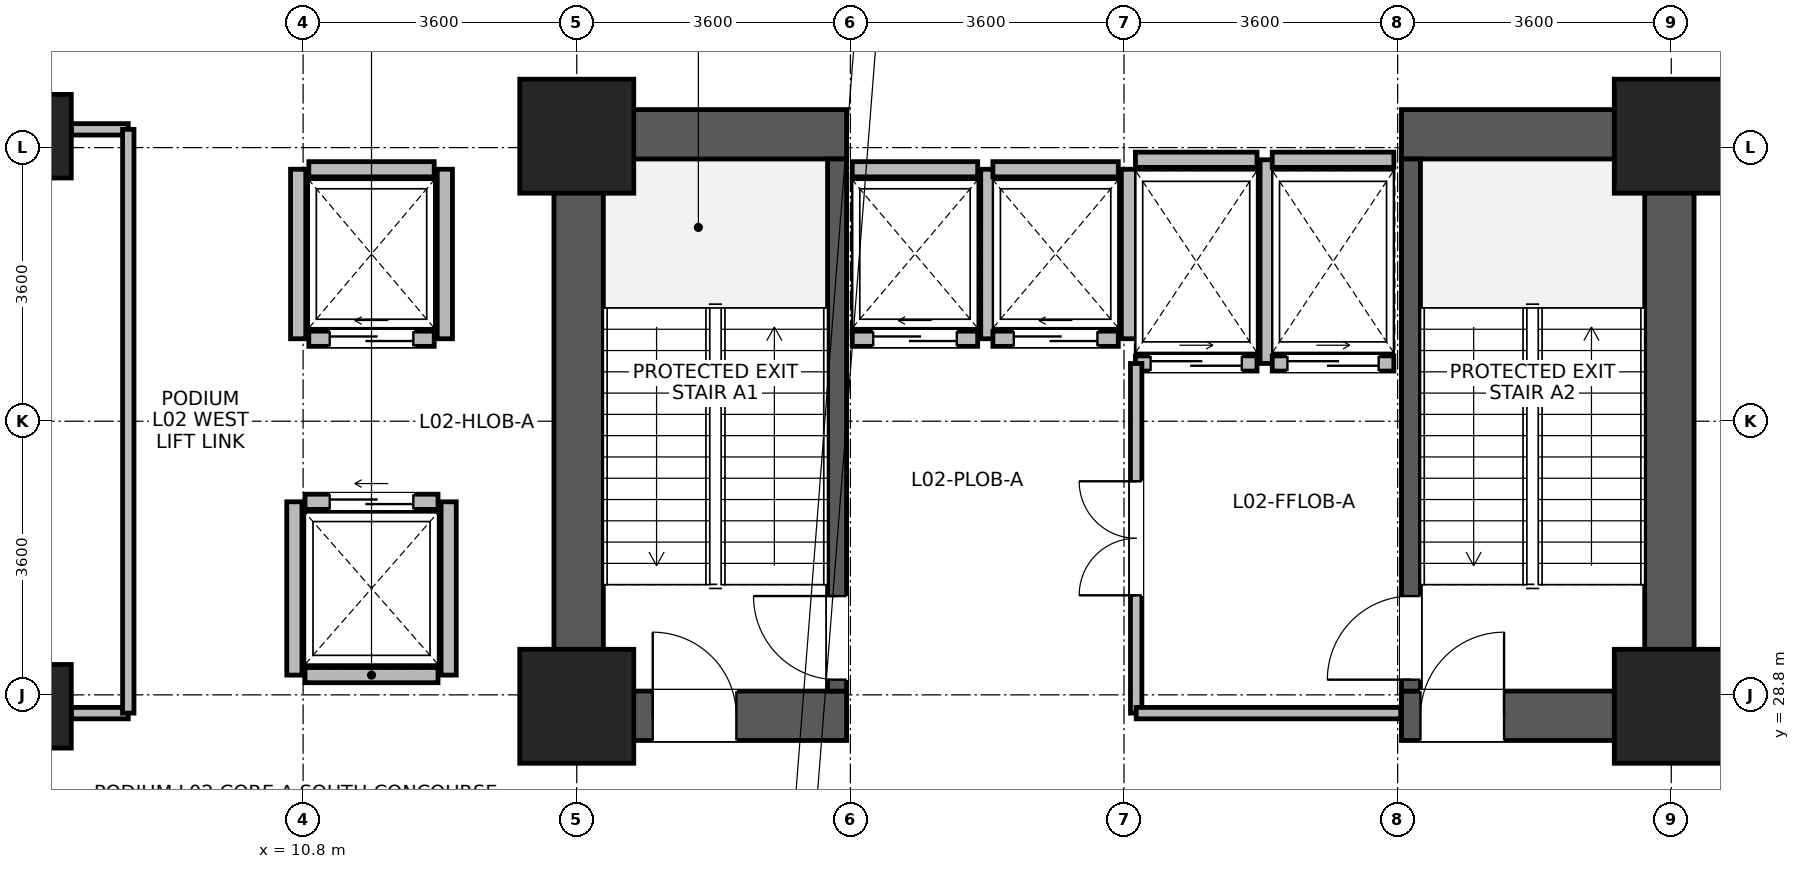
"""IFC4 building model, lengths in metres.
Left out: names, types, materials, properties, quantities, classifications, styles, units other than length and angle.
Written with IfcOpenShell. Run it as: python <this file> out.ifc"""

import sys

from ifc_helpers import new_model, si_unit, direction, frame, frame_2d, origin, origin_2d, place, context, subcontext, project, spatial, rectangle, circle, extrude, source, transform, mapped, element, fill, save


model = new_model("IFC4")
c1 = context("Model", 3, precision=1e-05, world=origin(), true_north=direction((0.0, 1.0)))
c2 = subcontext(c1, "Body", "Model", "MODEL_VIEW")
j1 = project(units=[si_unit("LENGTHUNIT", "METRE"), si_unit("PLANEANGLEUNIT", "RADIAN")], contexts=[c1])
p1 = place(None, origin())
s1 = spatial("IfcSite", under=j1, at=p1, CompositionType="ELEMENT")
p2 = place(p1, origin())
s2 = spatial("IfcBuilding", under=s1, at=p2, CompositionType="ELEMENT")
p3 = place(p2, frame((0.0, 0.0, 10.2)))
s3 = spatial("IfcBuildingStorey", under=s2, at=p3, CompositionType="ELEMENT", Elevation=10.2)
for number, where, z_axis, x_axis in (
    (1, (14.425, 28.2, 0.0), (0.0, 0.0, 1.0), (0.0, 1.0, 0.0)),
    (2, (28.775, 28.2, 0.0), (0.0, 0.0, 1.0), (0.0, 1.0, 0.0)),
):
    element("IfcWall", number, at=place(p3, frame(where, z_axis=z_axis, x_axis=x_axis)), inside=s3, PredefinedType="SHEAR", context=c2, shape_type="SweptSolid", body=[
        extrude(rectangle(XDim=8.3, YDim=0.65, at=frame_2d((4.15, 0.0))), origin(), (0.0, 0.0, 1.0), 4.52),
    ])
p4 = place(p3, frame((14.75, 28.525, 0.0), z_axis=(0.0, 0.0, 1.0), x_axis=(1.0, 0.0, 0.0)))
e3 = element("IfcWall", 3, at=p4, inside=s3, PredefinedType="SHEAR", context=c2, shape_type="SweptSolid", body=[
    extrude(rectangle(XDim=3.2, YDim=0.65, at=frame_2d((1.6, 0.0))), origin(), (0.0, 0.0, 1.0), 4.52),
])
p5 = place(p4, frame((0.65, 0.0, 0.0)))
e4 = element("IfcOpeningElement", 4, at=p5, cuts=e3, PredefinedType="OPENING", context=c2, shape_type="SweptSolid", body=[
    extrude(rectangle(XDim=1.1, YDim=2.08, at=frame_2d((0.55, 1.04))), frame((0.0, 0.335, 0.0), z_axis=(0.0, -1.0, 0.0), x_axis=(1.0, 0.0, 0.0)), (0.0, 0.0, 1.0), 0.67),
])
p6 = place(p3, frame((25.25, 28.525, 0.0), z_axis=(0.0, 0.0, 1.0), x_axis=(1.0, 0.0, 0.0)))
e5 = element("IfcWall", 5, at=p6, inside=s3, PredefinedType="SHEAR", context=c2, shape_type="SweptSolid", body=[
    extrude(rectangle(XDim=3.2, YDim=0.65, at=frame_2d((1.6, 0.0))), origin(), (0.0, 0.0, 1.0), 4.52),
])
p7 = place(p6, frame((0.25, 0.0, 0.0)))
e6 = element("IfcOpeningElement", 6, at=p7, cuts=e5, PredefinedType="OPENING", context=c2, shape_type="SweptSolid", body=[
    extrude(rectangle(XDim=1.1, YDim=2.08, at=frame_2d((0.55, 1.04))), frame((0.0, 0.335, 0.0), z_axis=(0.0, -1.0, 0.0), x_axis=(1.0, 0.0, 0.0)), (0.0, 0.0, 1.0), 0.67),
])
for number, where, z_axis, x_axis in (
    (7, (14.75, 36.175, 0.0), (0.0, 0.0, 1.0), (1.0, 0.0, 0.0)),
    (8, (25.25, 36.175, 0.0), (0.0, 0.0, 1.0), (1.0, 0.0, 0.0)),
):
    element("IfcWall", number, at=place(p3, frame(where, z_axis=z_axis, x_axis=x_axis)), inside=s3, PredefinedType="SHEAR", context=c2, shape_type="SweptSolid", body=[
        extrude(rectangle(XDim=3.2, YDim=0.65, at=frame_2d((1.6, 0.0))), origin(), (0.0, 0.0, 1.0), 4.52),
    ])
p8 = place(p3, frame((17.825, 28.85, 0.0), z_axis=(0.0, 0.0, 1.0), x_axis=(0.0, 1.0, 0.0)))
e9 = element("IfcWall", 9, at=p8, inside=s3, PredefinedType="SHEAR", context=c2, shape_type="SweptSolid", body=[
    extrude(rectangle(XDim=7.0, YDim=0.25, at=frame_2d((3.5, 0.0))), origin(), (0.0, 0.0, 1.0), 4.52),
])
p9 = place(p8, frame((0.15, 0.0, 0.0)))
e10 = element("IfcOpeningElement", 10, at=p9, cuts=e9, PredefinedType="OPENING", context=c2, shape_type="SweptSolid", body=[
    extrude(rectangle(XDim=1.1, YDim=2.08, at=frame_2d((0.55, 1.04))), frame((0.0, 0.135, 0.0), z_axis=(0.0, -1.0, 0.0), x_axis=(1.0, 0.0, 0.0)), (0.0, 0.0, 1.0), 0.27),
])
p10 = place(p3, frame((25.375, 28.85, 0.0), z_axis=(0.0, 0.0, 1.0), x_axis=(0.0, 1.0, 0.0)))
e11 = element("IfcWall", 11, at=p10, inside=s3, PredefinedType="SHEAR", context=c2, shape_type="SweptSolid", body=[
    extrude(rectangle(XDim=7.0, YDim=0.25, at=frame_2d((3.5, 0.0))), origin(), (0.0, 0.0, 1.0), 4.52),
])
p11 = place(p10, frame((0.15, 0.0, 0.0)))
e12 = element("IfcOpeningElement", 12, at=p11, cuts=e11, PredefinedType="OPENING", context=c2, shape_type="SweptSolid", body=[
    extrude(rectangle(XDim=1.1, YDim=2.08, at=frame_2d((0.55, 1.04))), frame((0.0, 0.135, 0.0), z_axis=(0.0, -1.0, 0.0), x_axis=(1.0, 0.0, 0.0)), (0.0, 0.0, 1.0), 0.27),
])
m1 = source(origin(), c2, "Body", "SweptSolid", [
    extrude(circle(Radius=0.55, at=origin_2d()), origin(), (0.0, 0.0, 1.0), 4.8),
])
for number, where, z_axis, x_axis in (
    (13, (7.2, 28.65, 0.0), (0.0, 0.0, 1.0), (1.0, 0.0, 0.0)),
    (14, (7.2, 36.15, 0.0), (0.0, 0.0, 1.0), (1.0, 0.0, 0.0)),
):
    element("IfcColumn", number, at=place(p3, frame(where, z_axis=z_axis, x_axis=x_axis)), inside=s3, PredefinedType="COLUMN", context=c2, shape_type="MappedRepresentation", body=[
        mapped(m1, transform((0.0, 0.0, 0.0), x_axis=(1.0, 0.0, 0.0), y_axis=(0.0, 1.0, 0.0), z_axis=(0.0, 0.0, 1.0), scale=1.0)),
    ])
m2 = source(origin(), c2, "Body", "SweptSolid", [
    extrude(rectangle(XDim=1.5, YDim=1.5, at=origin_2d()), origin(), (0.0, 0.0, 1.0), 4.8),
])
for number, where, z_axis, x_axis in (
    (15, (14.4, 28.65, 0.0), (0.0, 0.0, 1.0), (1.0, 0.0, 0.0)),
    (16, (14.4, 36.15, 0.0), (0.0, 0.0, 1.0), (1.0, 0.0, 0.0)),
    (17, (28.8, 28.65, 0.0), (0.0, 0.0, 1.0), (1.0, 0.0, 0.0)),
    (18, (28.8, 36.15, 0.0), (0.0, 0.0, 1.0), (1.0, 0.0, 0.0)),
):
    element("IfcColumn", number, at=place(p3, frame(where, z_axis=z_axis, x_axis=x_axis)), inside=s3, PredefinedType="COLUMN", context=c2, shape_type="MappedRepresentation", body=[
        mapped(m2, transform((0.0, 0.0, 0.0), x_axis=(1.0, 0.0, 0.0), y_axis=(0.0, 1.0, 0.0), z_axis=(0.0, 0.0, 1.0), scale=1.0)),
    ])
p12 = place(p3, frame((18.025, 33.485, 0.0), z_axis=(0.0, 0.0, 1.0), x_axis=(1.0, 0.0, 0.0)))
e19 = element("IfcWall", 19, at=p12, inside=s3, PredefinedType="PARTITIONING", context=c2, shape_type="SweptSolid", body=[
    extrude(rectangle(XDim=1.65, YDim=0.2, at=frame_2d((0.825, 0.0))), origin(), (0.0, 0.0, 1.0), 4.5),
])
p13 = place(p12, frame((0.275, 0.0, 0.0)))
e20 = element("IfcOpeningElement", 20, at=p13, cuts=e19, PredefinedType="OPENING", context=c2, shape_type="SweptSolid", body=[
    extrude(rectangle(XDim=1.1, YDim=2.12, at=frame_2d((0.55, 1.06))), frame((0.0, 0.11, 0.0), z_axis=(0.0, -1.0, 0.0), x_axis=(1.0, 0.0, 0.0)), (0.0, 0.0, 1.0), 0.22),
])
p14 = place(p3, frame((18.025, 35.715, 0.0), z_axis=(0.0, 0.0, 1.0), x_axis=(1.0, 0.0, 0.0)))
e21 = element("IfcWall", 21, at=p14, inside=s3, PredefinedType="PARTITIONING", context=c2, shape_type="SweptSolid", body=[
    extrude(rectangle(XDim=1.65, YDim=0.2, at=frame_2d((0.825, 0.0))), origin(), (0.0, 0.0, 1.0), 4.5),
])
p15 = place(p3, frame((19.815, 33.485, 0.0), z_axis=(0.0, 0.0, 1.0), x_axis=(0.0, 1.0, 0.0)))
e22 = element("IfcWall", 22, at=p15, inside=s3, PredefinedType="PARTITIONING", context=c2, shape_type="SweptSolid", body=[
    extrude(rectangle(XDim=2.23, YDim=0.2, at=frame_2d((1.115, 0.0))), origin(), (0.0, 0.0, 1.0), 4.5),
])
p16 = place(p3, frame((19.875, 33.485, 0.0), z_axis=(0.0, 0.0, 1.0), x_axis=(1.0, 0.0, 0.0)))
e23 = element("IfcWall", 23, at=p16, inside=s3, PredefinedType="PARTITIONING", context=c2, shape_type="SweptSolid", body=[
    extrude(rectangle(XDim=1.65, YDim=0.2, at=frame_2d((0.825, 0.0))), origin(), (0.0, 0.0, 1.0), 4.5),
])
p17 = place(p16, frame((0.275, 0.0, 0.0)))
e24 = element("IfcOpeningElement", 24, at=p17, cuts=e23, PredefinedType="OPENING", context=c2, shape_type="SweptSolid", body=[
    extrude(rectangle(XDim=1.1, YDim=2.12, at=frame_2d((0.55, 1.06))), frame((0.0, 0.11, 0.0), z_axis=(0.0, -1.0, 0.0), x_axis=(1.0, 0.0, 0.0)), (0.0, 0.0, 1.0), 0.22),
])
p18 = place(p3, frame((19.875, 35.715, 0.0), z_axis=(0.0, 0.0, 1.0), x_axis=(1.0, 0.0, 0.0)))
e25 = element("IfcWall", 25, at=p18, inside=s3, PredefinedType="PARTITIONING", context=c2, shape_type="SweptSolid", body=[
    extrude(rectangle(XDim=1.65, YDim=0.2, at=frame_2d((0.825, 0.0))), origin(), (0.0, 0.0, 1.0), 4.5),
])
p19 = place(p3, frame((21.665, 33.485, 0.0), z_axis=(0.0, 0.0, 1.0), x_axis=(0.0, 1.0, 0.0)))
e26 = element("IfcWall", 26, at=p19, inside=s3, PredefinedType="PARTITIONING", context=c2, shape_type="SweptSolid", body=[
    extrude(rectangle(XDim=2.23, YDim=0.2, at=frame_2d((1.115, 0.0))), origin(), (0.0, 0.0, 1.0), 4.5),
])
p20 = place(p3, frame((10.825, 29.06, 0.0), z_axis=(0.0, 0.0, 1.0), x_axis=(1.0, 0.0, 0.0)))
e27 = element("IfcWall", 27, at=p20, inside=s3, PredefinedType="PARTITIONING", context=c2, shape_type="SweptSolid", body=[
    extrude(rectangle(XDim=1.75, YDim=0.2, at=frame_2d((0.875, 0.0))), origin(), (0.0, 0.0, 1.0), 4.5),
])
p21 = place(p3, frame((10.825, 31.34, 0.0), z_axis=(0.0, 0.0, 1.0), x_axis=(1.0, 0.0, 0.0)))
e28 = element("IfcWall", 28, at=p21, inside=s3, PredefinedType="PARTITIONING", context=c2, shape_type="SweptSolid", body=[
    extrude(rectangle(XDim=1.75, YDim=0.2, at=frame_2d((0.875, 0.0))), origin(), (0.0, 0.0, 1.0), 4.5),
])
p22 = place(p21, frame((0.325, 0.0, 0.0)))
e29 = element("IfcOpeningElement", 29, at=p22, cuts=e28, PredefinedType="OPENING", context=c2, shape_type="SweptSolid", body=[
    extrude(rectangle(XDim=1.1, YDim=2.12, at=frame_2d((0.55, 1.06))), frame((0.0, 0.11, 0.0), z_axis=(0.0, -1.0, 0.0), x_axis=(1.0, 0.0, 0.0)), (0.0, 0.0, 1.0), 0.22),
])
for number, where, z_axis, x_axis in (
    (30, (10.685, 29.06, 0.0), (0.0, 0.0, 1.0), (0.0, 1.0, 0.0)),
    (31, (12.715, 29.06, 0.0), (0.0, 0.0, 1.0), (0.0, 1.0, 0.0)),
):
    element("IfcWall", number, at=place(p3, frame(where, z_axis=z_axis, x_axis=x_axis)), inside=s3, PredefinedType="PARTITIONING", context=c2, shape_type="SweptSolid", body=[
        extrude(rectangle(XDim=2.28, YDim=0.2, at=frame_2d((1.14, 0.0))), origin(), (0.0, 0.0, 1.0), 4.5),
    ])
p23 = place(p3, frame((10.875, 33.485, 0.0), z_axis=(0.0, 0.0, 1.0), x_axis=(1.0, 0.0, 0.0)))
e32 = element("IfcWall", 32, at=p23, inside=s3, PredefinedType="PARTITIONING", context=c2, shape_type="SweptSolid", body=[
    extrude(rectangle(XDim=1.65, YDim=0.2, at=frame_2d((0.825, 0.0))), origin(), (0.0, 0.0, 1.0), 4.5),
])
p24 = place(p23, frame((0.275, 0.0, 0.0)))
e33 = element("IfcOpeningElement", 33, at=p24, cuts=e32, PredefinedType="OPENING", context=c2, shape_type="SweptSolid", body=[
    extrude(rectangle(XDim=1.1, YDim=2.12, at=frame_2d((0.55, 1.06))), frame((0.0, 0.11, 0.0), z_axis=(0.0, -1.0, 0.0), x_axis=(1.0, 0.0, 0.0)), (0.0, 0.0, 1.0), 0.22),
])
p25 = place(p3, frame((10.875, 35.715, 0.0), z_axis=(0.0, 0.0, 1.0), x_axis=(1.0, 0.0, 0.0)))
e34 = element("IfcWall", 34, at=p25, inside=s3, PredefinedType="PARTITIONING", context=c2, shape_type="SweptSolid", body=[
    extrude(rectangle(XDim=1.65, YDim=0.2, at=frame_2d((0.825, 0.0))), origin(), (0.0, 0.0, 1.0), 4.5),
])
for number, where, z_axis, x_axis in (
    (35, (10.735, 33.485, 0.0), (0.0, 0.0, 1.0), (0.0, 1.0, 0.0)),
    (36, (12.665, 33.485, 0.0), (0.0, 0.0, 1.0), (0.0, 1.0, 0.0)),
):
    element("IfcWall", number, at=place(p3, frame(where, z_axis=z_axis, x_axis=x_axis)), inside=s3, PredefinedType="PARTITIONING", context=c2, shape_type="SweptSolid", body=[
        extrude(rectangle(XDim=2.23, YDim=0.2, at=frame_2d((1.115, 0.0))), origin(), (0.0, 0.0, 1.0), 4.5),
    ])
p26 = place(p3, frame((21.75, 33.16, 0.0), z_axis=(0.0, 0.0, 1.0), x_axis=(1.0, 0.0, 0.0)))
e37 = element("IfcWall", 37, at=p26, inside=s3, PredefinedType="PARTITIONING", context=c2, shape_type="SweptSolid", body=[
    extrude(rectangle(XDim=1.6, YDim=0.2, at=frame_2d((0.8, 0.0))), origin(), (0.0, 0.0, 1.0), 4.5),
])
p27 = place(p26, frame((0.2, 0.0, 0.0)))
e38 = element("IfcOpeningElement", 38, at=p27, cuts=e37, PredefinedType="OPENING", context=c2, shape_type="SweptSolid", body=[
    extrude(rectangle(XDim=1.2, YDim=2.12, at=frame_2d((0.6, 1.06))), frame((0.0, 0.11, 0.0), z_axis=(0.0, -1.0, 0.0), x_axis=(1.0, 0.0, 0.0)), (0.0, 0.0, 1.0), 0.22),
])
p28 = place(p3, frame((21.75, 35.84, 0.0), z_axis=(0.0, 0.0, 1.0), x_axis=(1.0, 0.0, 0.0)))
e39 = element("IfcWall", 39, at=p28, inside=s3, PredefinedType="PARTITIONING", context=c2, shape_type="SweptSolid", body=[
    extrude(rectangle(XDim=1.6, YDim=0.2, at=frame_2d((0.8, 0.0))), origin(), (0.0, 0.0, 1.0), 3.3),
])
p29 = place(p3, frame((23.49, 33.16, 0.0), z_axis=(0.0, 0.0, 1.0), x_axis=(0.0, 1.0, 0.0)))
e40 = element("IfcWall", 40, at=p29, inside=s3, PredefinedType="PARTITIONING", context=c2, shape_type="SweptSolid", body=[
    extrude(rectangle(XDim=2.68, YDim=0.2, at=frame_2d((1.34, 0.0))), origin(), (0.0, 0.0, 1.0), 4.5),
])
p30 = place(p3, frame((23.55, 33.16, 0.0), z_axis=(0.0, 0.0, 1.0), x_axis=(1.0, 0.0, 0.0)))
e41 = element("IfcWall", 41, at=p30, inside=s3, PredefinedType="PARTITIONING", context=c2, shape_type="SweptSolid", body=[
    extrude(rectangle(XDim=1.6, YDim=0.2, at=frame_2d((0.8, 0.0))), origin(), (0.0, 0.0, 1.0), 4.5),
])
p31 = place(p30, frame((0.2, 0.0, 0.0)))
e42 = element("IfcOpeningElement", 42, at=p31, cuts=e41, PredefinedType="OPENING", context=c2, shape_type="SweptSolid", body=[
    extrude(rectangle(XDim=1.2, YDim=2.12, at=frame_2d((0.6, 1.06))), frame((0.0, 0.11, 0.0), z_axis=(0.0, -1.0, 0.0), x_axis=(1.0, 0.0, 0.0)), (0.0, 0.0, 1.0), 0.22),
])
p32 = place(p3, frame((23.55, 35.84, 0.0), z_axis=(0.0, 0.0, 1.0), x_axis=(1.0, 0.0, 0.0)))
e43 = element("IfcWall", 43, at=p32, inside=s3, PredefinedType="PARTITIONING", context=c2, shape_type="SweptSolid", body=[
    extrude(rectangle(XDim=1.6, YDim=0.2, at=frame_2d((0.8, 0.0))), origin(), (0.0, 0.0, 1.0), 3.3),
])
for number, where, z_axis, x_axis in (
    (44, (7.75, 28.56, 0.0), (0.0, 0.0, 1.0), (1.0, 0.0, 0.0)),
    (45, (7.75, 36.24, 0.0), (0.0, 0.0, 1.0), (1.0, 0.0, 0.0)),
):
    element("IfcWall", number, at=place(p3, frame(where, z_axis=z_axis, x_axis=x_axis)), inside=s3, PredefinedType="PARTITIONING", context=c2, shape_type="SweptSolid", body=[
        extrude(rectangle(XDim=0.75, YDim=0.15, at=frame_2d((0.375, 0.0))), origin(), (0.0, 0.0, 1.0), 3.8),
    ])
p33 = place(p3, frame((8.5, 28.56, 0.0), z_axis=(0.0, 0.0, 1.0), x_axis=(0.0, 1.0, 0.0)))
e46 = element("IfcWall", 46, at=p33, inside=s3, PredefinedType="PARTITIONING", context=c2, shape_type="SweptSolid", body=[
    extrude(rectangle(XDim=7.68, YDim=0.15, at=frame_2d((3.84, 0.0))), origin(), (0.0, 0.0, 1.0), 4.5),
])
p34 = place(p3, frame((21.76, 28.56, 0.0), z_axis=(0.0, 0.0, 1.0), x_axis=(0.0, 1.0, 0.0)))
e47 = element("IfcWall", 47, at=p34, inside=s3, PredefinedType="PARTITIONING", context=c2, shape_type="SweptSolid", body=[
    extrude(rectangle(XDim=4.6, YDim=0.15, at=frame_2d((2.3, 0.0))), origin(), (0.0, 0.0, 1.0), 4.5),
])
p35 = place(p34, frame((1.55, 0.0, 0.0)))
e48 = element("IfcOpeningElement", 48, at=p35, cuts=e47, PredefinedType="OPENING", context=c2, shape_type="SweptSolid", body=[
    extrude(rectangle(XDim=1.5, YDim=2.1, at=frame_2d((0.75, 1.05))), frame((0.0, 0.085, 0.0), z_axis=(0.0, -1.0, 0.0), x_axis=(1.0, 0.0, 0.0)), (0.0, 0.0, 1.0), 0.17),
])
p36 = place(p3, frame((21.76, 28.56, 0.0), z_axis=(0.0, 0.0, 1.0), x_axis=(1.0, 0.0, 0.0)))
e49 = element("IfcWall", 49, at=p36, inside=s3, PredefinedType="PARTITIONING", context=c2, shape_type="SweptSolid", body=[
    extrude(rectangle(XDim=3.48, YDim=0.15, at=frame_2d((1.74, 0.0))), origin(), (0.0, 0.0, 1.0), 3.3),
])
p37 = place(p9, origin())
e50 = element("IfcDoor", 50, at=p37, inside=s3, OperationType="SINGLE_SWING_RIGHT", PredefinedType="DOOR", context=c2, shape_type="SweptSolid", body=[
    extrude(rectangle(XDim=1.1, YDim=2.08, at=frame_2d((0.55, 1.04))), frame((0.0, 0.025, 0.0), z_axis=(0.0, -1.0, 0.0), x_axis=(1.0, 0.0, 0.0)), (0.0, 0.0, 1.0), 0.05),
])
fill(e10, e50)
p38 = place(p5, origin())
e51 = element("IfcDoor", 51, at=p38, inside=s3, OperationType="SINGLE_SWING_LEFT", PredefinedType="DOOR", context=c2, shape_type="SweptSolid", body=[
    extrude(rectangle(XDim=1.1, YDim=2.08, at=frame_2d((0.55, 1.04))), frame((0.0, 0.025, 0.0), z_axis=(0.0, -1.0, 0.0), x_axis=(1.0, 0.0, 0.0)), (0.0, 0.0, 1.0), 0.05),
])
fill(e4, e51)
p39 = place(p11, origin())
e52 = element("IfcDoor", 52, at=p39, inside=s3, OperationType="SINGLE_SWING_LEFT", PredefinedType="DOOR", context=c2, shape_type="SweptSolid", body=[
    extrude(rectangle(XDim=1.1, YDim=2.08, at=frame_2d((0.55, 1.04))), frame((0.0, 0.025, 0.0), z_axis=(0.0, -1.0, 0.0), x_axis=(1.0, 0.0, 0.0)), (0.0, 0.0, 1.0), 0.05),
])
fill(e12, e52)
p40 = place(p7, origin())
e53 = element("IfcDoor", 53, at=p40, inside=s3, OperationType="SINGLE_SWING_RIGHT", PredefinedType="DOOR", context=c2, shape_type="SweptSolid", body=[
    extrude(rectangle(XDim=1.1, YDim=2.08, at=frame_2d((0.55, 1.04))), frame((0.0, 0.025, 0.0), z_axis=(0.0, -1.0, 0.0), x_axis=(1.0, 0.0, 0.0)), (0.0, 0.0, 1.0), 0.05),
])
fill(e6, e53)
p41 = place(p13, origin())
e54 = element("IfcDoor", 54, at=p41, inside=s3, OperationType="SLIDING_TO_LEFT", PredefinedType="DOOR", context=c2, shape_type="SweptSolid", body=[
    extrude(rectangle(XDim=1.1, YDim=2.12, at=frame_2d((0.55, 1.06))), frame((0.0, 0.025, 0.0), z_axis=(0.0, -1.0, 0.0), x_axis=(1.0, 0.0, 0.0)), (0.0, 0.0, 1.0), 0.05),
])
fill(e20, e54)
p42 = place(p17, origin())
e55 = element("IfcDoor", 55, at=p42, inside=s3, OperationType="SLIDING_TO_LEFT", PredefinedType="DOOR", context=c2, shape_type="SweptSolid", body=[
    extrude(rectangle(XDim=1.1, YDim=2.12, at=frame_2d((0.55, 1.06))), frame((0.0, 0.025, 0.0), z_axis=(0.0, -1.0, 0.0), x_axis=(1.0, 0.0, 0.0)), (0.0, 0.0, 1.0), 0.05),
])
fill(e24, e55)
p43 = place(p22, origin())
e56 = element("IfcDoor", 56, at=p43, inside=s3, OperationType="SLIDING_TO_LEFT", PredefinedType="DOOR", context=c2, shape_type="SweptSolid", body=[
    extrude(rectangle(XDim=1.1, YDim=2.12, at=frame_2d((0.55, 1.06))), frame((0.0, 0.025, 0.0), z_axis=(0.0, -1.0, 0.0), x_axis=(1.0, 0.0, 0.0)), (0.0, 0.0, 1.0), 0.05),
])
fill(e29, e56)
p44 = place(p24, origin())
e57 = element("IfcDoor", 57, at=p44, inside=s3, OperationType="SLIDING_TO_LEFT", PredefinedType="DOOR", context=c2, shape_type="SweptSolid", body=[
    extrude(rectangle(XDim=1.1, YDim=2.12, at=frame_2d((0.55, 1.06))), frame((0.0, 0.025, 0.0), z_axis=(0.0, -1.0, 0.0), x_axis=(1.0, 0.0, 0.0)), (0.0, 0.0, 1.0), 0.05),
])
fill(e33, e57)
p45 = place(p27, origin())
e58 = element("IfcDoor", 58, at=p45, inside=s3, OperationType="SLIDING_TO_RIGHT", PredefinedType="DOOR", context=c2, shape_type="SweptSolid", body=[
    extrude(rectangle(XDim=1.2, YDim=2.12, at=frame_2d((0.6, 1.06))), frame((0.0, 0.025, 0.0), z_axis=(0.0, -1.0, 0.0), x_axis=(1.0, 0.0, 0.0)), (0.0, 0.0, 1.0), 0.05),
])
fill(e38, e58)
p46 = place(p31, origin())
e59 = element("IfcDoor", 59, at=p46, inside=s3, OperationType="SLIDING_TO_RIGHT", PredefinedType="DOOR", context=c2, shape_type="SweptSolid", body=[
    extrude(rectangle(XDim=1.2, YDim=2.12, at=frame_2d((0.6, 1.06))), frame((0.0, 0.025, 0.0), z_axis=(0.0, -1.0, 0.0), x_axis=(1.0, 0.0, 0.0)), (0.0, 0.0, 1.0), 0.05),
])
fill(e42, e59)
p47 = place(p35, origin())
e60 = element("IfcDoor", 60, at=p47, inside=s3, OperationType="DOUBLE_DOOR_SINGLE_SWING", PredefinedType="DOOR", context=c2, shape_type="SweptSolid", body=[
    extrude(rectangle(XDim=1.5, YDim=2.1, at=frame_2d((0.75, 1.05))), frame((0.0, 0.025, 0.0), z_axis=(0.0, -1.0, 0.0), x_axis=(1.0, 0.0, 0.0)), (0.0, 0.0, 1.0), 0.05),
])
fill(e48, e60)
save(model, sys.argv[1])
